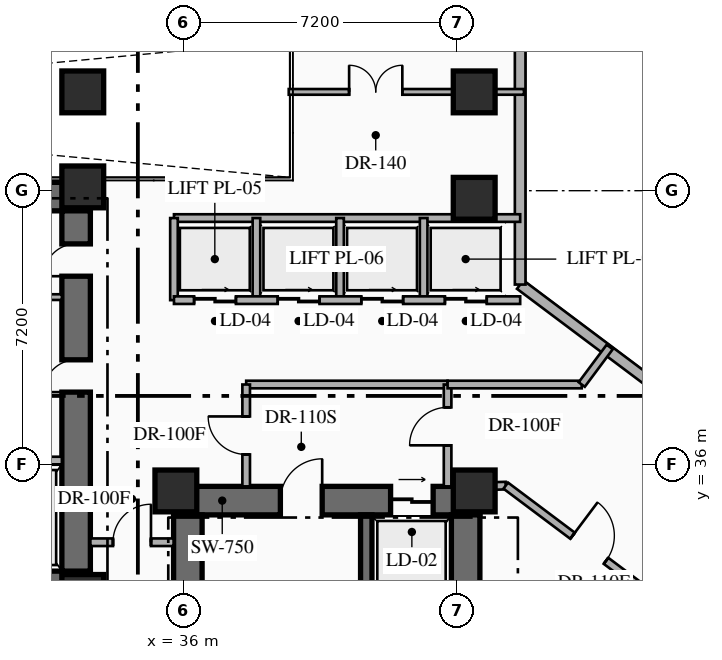
"""IFC4 building model, lengths in metres.
Left out: names, types, materials, properties, quantities, classifications, styles, units other than length and angle.
Written with IfcOpenShell. Run it as: python <this file> out.ifc"""

import sys

from ifc_helpers import new_model, si_unit, direction, frame, frame_2d, origin, origin_2d, place, context, subcontext, project, spatial, rectangle, hollow_rectangle, extrude, element, fill, save


model = new_model("IFC4")
c1 = context("Model", 3, precision=1e-05, world=origin(), true_north=direction((0.0, 1.0)))
c2 = subcontext(c1, "Body", "Model", "MODEL_VIEW")
j1 = project(units=[si_unit("LENGTHUNIT", "METRE"), si_unit("PLANEANGLEUNIT", "RADIAN")], contexts=[c1])
p1 = place(None, origin())
s1 = spatial("IfcSite", under=j1, at=p1, CompositionType="ELEMENT")
p2 = place(p1, origin())
s2 = spatial("IfcBuilding", under=s1, at=p2, CompositionType="ELEMENT")
p3 = place(p2, origin())
s3 = spatial("IfcBuildingStorey", under=s2, at=p3, CompositionType="ELEMENT", Elevation=0.0)
p4 = place(p3, frame((25.47, 32.815, 0.0), z_axis=(0.0, 0.0, 1.0), x_axis=(1.0, 0.0, 0.0)))
e1 = element("IfcWall", 1, at=p4, inside=s3, PredefinedType="SHEAR", context=c2, shape_type="SweptSolid", body=[
    extrude(rectangle(XDim=8.08, YDim=0.75, at=frame_2d((4.04, 0.0))), origin(), (0.0, 0.0, 1.0), 5.4),
])
p5 = place(p4, frame((2.98, 0.0, 0.0)))
e2 = element("IfcOpeningElement", 2, at=p5, cuts=e1, PredefinedType="OPENING", context=c2, shape_type="SweptSolid", body=[
    extrude(rectangle(XDim=1.1, YDim=2.2, at=frame_2d((0.55, 1.1))), frame((0.0, 0.385, 0.0), z_axis=(0.0, -1.0, 0.0), x_axis=(1.0, 0.0, 0.0)), (0.0, 0.0, 1.0), 0.77),
])
p6 = place(p4, frame((5.73, 0.0, 0.0)))
e3 = element("IfcOpeningElement", 3, at=p6, cuts=e1, PredefinedType="OPENING", context=c2, shape_type="SweptSolid", body=[
    extrude(rectangle(XDim=1.1, YDim=2.15, at=frame_2d((0.55, 1.075))), frame((0.0, 0.385, 0.0), z_axis=(0.0, -1.0, 0.0), x_axis=(1.0, 0.0, 0.0)), (0.0, 0.0, 1.0), 0.77),
])
p7 = place(p3, frame((25.47, 43.045, 0.0), z_axis=(0.0, 0.0, 1.0), x_axis=(1.0, 0.0, 0.0)))
e4 = element("IfcWall", 4, at=p7, inside=s3, PredefinedType="SHEAR", context=c2, shape_type="SweptSolid", body=[
    extrude(rectangle(XDim=8.08, YDim=0.75, at=frame_2d((4.04, 0.0))), origin(), (0.0, 0.0, 1.0), 5.4),
])
p8 = place(p3, frame((33.175, 33.19, 0.0), z_axis=(0.0, 0.0, 1.0), x_axis=(0.0, 1.0, 0.0)))
e5 = element("IfcWall", 5, at=p8, inside=s3, PredefinedType="SHEAR", context=c2, shape_type="SweptSolid", body=[
    extrude(rectangle(XDim=9.48, YDim=0.75, at=frame_2d((4.74, 0.0))), origin(), (0.0, 0.0, 1.0), 5.4),
])
p9 = place(p8, frame((4.71, 0.0, 0.0)))
e6 = element("IfcOpeningElement", 6, at=p9, cuts=e5, PredefinedType="OPENING", context=c2, shape_type="SweptSolid", body=[
    extrude(rectangle(XDim=0.85, YDim=2.08, at=frame_2d((0.425, 1.04))), frame((0.0, 0.385, 0.0), z_axis=(0.0, -1.0, 0.0), x_axis=(1.0, 0.0, 0.0)), (0.0, 0.0, 1.0), 0.77),
])
p10 = place(p8, frame((7.76, 0.0, 0.0)))
e7 = element("IfcOpeningElement", 7, at=p10, cuts=e5, PredefinedType="OPENING", context=c2, shape_type="SweptSolid", body=[
    extrude(rectangle(XDim=0.85, YDim=2.08, at=frame_2d((0.425, 1.04))), frame((0.0, 0.385, 0.0), z_axis=(0.0, -1.0, 0.0), x_axis=(1.0, 0.0, 0.0)), (0.0, 0.0, 1.0), 0.77),
])
p11 = place(p3, frame((35.74, 35.045, 0.0), z_axis=(0.0, 0.0, 1.0), x_axis=(1.0, 0.0, 0.0)))
e8 = element("IfcWall", 8, at=p11, inside=s3, PredefinedType="SHEAR", context=c2, shape_type="SweptSolid", body=[
    extrude(rectangle(XDim=8.06, YDim=0.75, at=frame_2d((4.03, 0.0))), origin(), (0.0, 0.0, 1.0), 5.4),
])
p12 = place(p11, frame((2.81, 0.0, 0.0)))
e9 = element("IfcOpeningElement", 9, at=p12, cuts=e8, PredefinedType="OPENING", context=c2, shape_type="SweptSolid", body=[
    extrude(rectangle(XDim=1.1, YDim=2.2, at=frame_2d((0.55, 1.1))), frame((0.0, 0.385, 0.0), z_axis=(0.0, -1.0, 0.0), x_axis=(1.0, 0.0, 0.0)), (0.0, 0.0, 1.0), 0.77),
])
p13 = place(p11, frame((5.71, 0.0, 0.0)))
e10 = element("IfcOpeningElement", 10, at=p13, cuts=e8, PredefinedType="OPENING", context=c2, shape_type="SweptSolid", body=[
    extrude(rectangle(XDim=1.12, YDim=2.15, at=frame_2d((0.56, 1.075))), frame((0.0, 0.385, 0.0), z_axis=(0.0, -1.0, 0.0), x_axis=(1.0, 0.0, 0.0)), (0.0, 0.0, 1.0), 0.77),
])
p14 = place(p3, frame((36.115, 25.19, 0.0), z_axis=(0.0, 0.0, 1.0), x_axis=(0.0, 1.0, 0.0)))
e11 = element("IfcWall", 11, at=p14, inside=s3, PredefinedType="SHEAR", context=c2, shape_type="SweptSolid", body=[
    extrude(rectangle(XDim=9.48, YDim=0.75, at=frame_2d((4.74, 0.0))), origin(), (0.0, 0.0, 1.0), 5.4),
])
p15 = place(p3, frame((43.425, 25.19, 0.0), z_axis=(0.0, 0.0, 1.0), x_axis=(0.0, 1.0, 0.0)))
e12 = element("IfcWall", 12, at=p15, inside=s3, PredefinedType="SHEAR", context=c2, shape_type="SweptSolid", body=[
    extrude(rectangle(XDim=9.48, YDim=0.75, at=frame_2d((4.74, 0.0))), origin(), (0.0, 0.0, 1.0), 5.4),
])
p16 = place(p15, frame((1.51, 0.0, 0.0)))
e13 = element("IfcOpeningElement", 13, at=p16, cuts=e12, PredefinedType="OPENING", context=c2, shape_type="SweptSolid", body=[
    extrude(rectangle(XDim=0.85, YDim=2.08, at=frame_2d((0.425, 1.04))), frame((0.0, 0.385, 0.0), z_axis=(0.0, -1.0, 0.0), x_axis=(1.0, 0.0, 0.0)), (0.0, 0.0, 1.0), 0.77),
])
p17 = place(p15, frame((4.76, 0.0, 0.0)))
e14 = element("IfcOpeningElement", 14, at=p17, cuts=e12, PredefinedType="OPENING", context=c2, shape_type="SweptSolid", body=[
    extrude(rectangle(XDim=0.85, YDim=2.08, at=frame_2d((0.425, 1.04))), frame((0.0, 0.385, 0.0), z_axis=(0.0, -1.0, 0.0), x_axis=(1.0, 0.0, 0.0)), (0.0, 0.0, 1.0), 0.77),
])
p18 = place(p3, frame((40.81, 25.19, 0.0), z_axis=(0.0, 0.0, 1.0), x_axis=(0.0, 1.0, 0.0)))
e15 = element("IfcWall", 15, at=p18, inside=s3, PredefinedType="SHEAR", context=c2, shape_type="SweptSolid", body=[
    extrude(rectangle(XDim=9.48, YDim=0.3, at=frame_2d((4.74, 0.0))), origin(), (0.0, 0.0, 1.0), 5.4),
])
for number, where, z_axis, x_axis in (
    (16, (33.35, 32.55, 0.0), (0.0, 0.0, 1.0), (1.0, 0.0, 0.0)),
    (17, (33.35, 43.3, 0.0), (0.0, 0.0, 1.0), (1.0, 0.0, 0.0)),
    (18, (35.8, 35.3, 0.0), (0.0, 0.0, 1.0), (1.0, 0.0, 0.0)),
    (19, (43.65, 35.3, 0.0), (0.0, 0.0, 1.0), (1.0, 0.0, 0.0)),
    (20, (43.65, 43.0, 0.0), (0.0, 0.0, 1.0), (1.0, 0.0, 0.0)),
):
    element("IfcColumn", number, at=place(p3, frame(where, z_axis=z_axis, x_axis=x_axis)), inside=s3, PredefinedType="COLUMN", context=c2, shape_type="SweptSolid", body=[
        extrude(rectangle(XDim=1.1, YDim=1.1, at=origin_2d()), origin(), (0.0, 0.0, 1.0), 5.4),
    ])
for number, where, z_axis, x_axis in (
    (21, (33.35, 45.8, 0.0), (0.0, 0.0, 1.0), (1.0, 0.0, 0.0)),
    (22, (43.65, 45.8, 0.0), (0.0, 0.0, 1.0), (1.0, 0.0, 0.0)),
):
    element("IfcColumn", number, at=place(p3, frame(where, z_axis=z_axis, x_axis=x_axis)), inside=s3, PredefinedType="COLUMN", context=c2, shape_type="SweptSolid", body=[
        extrude(hollow_rectangle(XDim=1.1, YDim=1.1, WallThickness=0.04, at=origin_2d()), origin(), (0.0, 0.0, 1.0), 5.4),
    ])
p19 = place(p3, frame((44.86, 40.73, 0.0), z_axis=(0.0, 0.0, 1.0), x_axis=(0.800006570398, -0.599991239369, 0.0)))
e23 = element("IfcWall", 23, at=p19, inside=s3, PredefinedType="STANDARD", context=c2, shape_type="SweptSolid", body=[
    extrude(rectangle(XDim=31.212, YDim=0.28, at=frame_2d((15.606, 0.0))), origin(), (0.0, 0.0, 1.0), 5.1),
])
p20 = place(p19, frame((4.5, 0.0, 0.0)))
e24 = element("IfcOpeningElement", 24, at=p20, cuts=e23, PredefinedType="OPENING", context=c2, shape_type="SweptSolid", body=[
    extrude(rectangle(XDim=2.1, YDim=2.3, at=frame_2d((1.05, 1.15))), frame((0.0, 0.15, 0.0), z_axis=(0.0, -1.0, 0.0), x_axis=(1.0, 0.0, 0.0)), (0.0, 0.0, 1.0), 0.3),
])
p21 = place(p19, frame((13.932, 0.0, 0.0)))
e25 = element("IfcOpeningElement", 25, at=p21, cuts=e23, PredefinedType="OPENING", context=c2, shape_type="SweptSolid", body=[
    extrude(rectangle(XDim=2.1, YDim=2.3, at=frame_2d((1.05, 1.15))), frame((0.0, 0.15, 0.0), z_axis=(0.0, -1.0, 0.0), x_axis=(1.0, 0.0, 0.0)), (0.0, 0.0, 1.0), 0.3),
])
p22 = place(p19, frame((21.423, 0.0, 0.0)))
e26 = element("IfcOpeningElement", 26, at=p22, cuts=e23, PredefinedType="OPENING", context=c2, shape_type="SweptSolid", body=[
    extrude(rectangle(XDim=2.1, YDim=2.3, at=frame_2d((1.05, 1.15))), frame((0.0, 0.15, 0.0), z_axis=(0.0, -1.0, 0.0), x_axis=(1.0, 0.0, 0.0)), (0.0, 0.0, 1.0), 0.3),
])
p23 = place(p19, frame((25.168, 0.0, 0.0)))
e27 = element("IfcOpeningElement", 27, at=p23, cuts=e23, PredefinedType="OPENING", context=c2, shape_type="SweptSolid", body=[
    extrude(rectangle(XDim=2.1, YDim=2.3, at=frame_2d((1.05, 1.15))), frame((0.0, 0.15, 0.0), z_axis=(0.0, -1.0, 0.0), x_axis=(1.0, 0.0, 0.0)), (0.0, 0.0, 1.0), 0.3),
])
p24 = place(p3, frame((44.86, 49.142, 0.0), z_axis=(0.0, 0.0, 1.0), x_axis=(0.0, -1.0, 0.0)))
e28 = element("IfcWall", 28, at=p24, inside=s3, PredefinedType="STANDARD", context=c2, shape_type="SweptSolid", body=[
    extrude(rectangle(XDim=8.412, YDim=0.28, at=frame_2d((4.206, 0.0))), origin(), (0.0, 0.0, 1.0), 5.1),
])
p25 = place(p3, frame((30.7, 36.1, 0.0), z_axis=(0.0, 0.0, 1.0), x_axis=(1.0, 0.0, 0.0)))
e29 = element("IfcWall", 29, at=p25, inside=s3, PredefinedType="STANDARD", context=c2, shape_type="SweptSolid", body=[
    extrude(rectangle(XDim=2.1, YDim=0.2, at=frame_2d((1.05, 0.0))), origin(), (0.0, 0.0, 1.0), 5.1),
])
p26 = place(p3, frame((30.7, 40.4, 0.0), z_axis=(0.0, 0.0, 1.0), x_axis=(1.0, 0.0, 0.0)))
e30 = element("IfcWall", 30, at=p26, inside=s3, PredefinedType="PARTITIONING", context=c2, shape_type="SweptSolid", body=[
    extrude(rectangle(XDim=2.1, YDim=0.15, at=frame_2d((1.05, 0.0))), origin(), (0.0, 0.0, 1.0), 5.1),
])
p27 = place(p3, frame((37.65, 38.1, 0.0), z_axis=(0.0, 0.0, 1.0), x_axis=(1.0, 0.0, 0.0)))
e31 = element("IfcWall", 31, at=p27, inside=s3, PredefinedType="STANDARD", context=c2, shape_type="SweptSolid", body=[
    extrude(rectangle(XDim=5.3, YDim=0.2, at=frame_2d((2.65, 0.0))), origin(), (0.0, 0.0, 1.0), 5.1),
])
p28 = place(p3, frame((42.95, 35.42, 0.0), z_axis=(0.0, 0.0, 1.0), x_axis=(0.0, 1.0, 0.0)))
e32 = element("IfcWall", 32, at=p28, inside=s3, PredefinedType="STANDARD", context=c2, shape_type="SweptSolid", body=[
    extrude(rectangle(XDim=2.68, YDim=0.2, at=frame_2d((1.34, 0.0))), origin(), (0.0, 0.0, 1.0), 5.1),
])
p29 = place(p28, frame((1.08, 0.0, 0.0)))
e33 = element("IfcOpeningElement", 33, at=p29, cuts=e32, PredefinedType="OPENING", context=c2, shape_type="SweptSolid", body=[
    extrude(rectangle(XDim=1.0, YDim=2.2, at=frame_2d((0.5, 1.1))), frame((0.0, 0.11, 0.0), z_axis=(0.0, -1.0, 0.0), x_axis=(1.0, 0.0, 0.0)), (0.0, 0.0, 1.0), 0.22),
])
p30 = place(p3, frame((37.65, 35.42, 0.0), z_axis=(0.0, 0.0, 1.0), x_axis=(0.0, 1.0, 0.0)))
e34 = element("IfcWall", 34, at=p30, inside=s3, PredefinedType="STANDARD", context=c2, shape_type="SweptSolid", body=[
    extrude(rectangle(XDim=2.68, YDim=0.2, at=frame_2d((1.34, 0.0))), origin(), (0.0, 0.0, 1.0), 5.1),
])
p31 = place(p30, frame((0.84, 0.0, 0.0)))
e35 = element("IfcOpeningElement", 35, at=p31, cuts=e34, PredefinedType="OPENING", context=c2, shape_type="SweptSolid", body=[
    extrude(rectangle(XDim=1.0, YDim=2.2, at=frame_2d((0.5, 1.1))), frame((0.0, 0.11, 0.0), z_axis=(0.0, -1.0, 0.0), x_axis=(1.0, 0.0, 0.0)), (0.0, 0.0, 1.0), 0.22),
])
p32 = place(p3, frame((35.75, 42.48, 0.0), z_axis=(0.0, 0.0, 1.0), x_axis=(1.0, 0.0, 0.0)))
e36 = element("IfcWall", 36, at=p32, inside=s3, PredefinedType="STANDARD", context=c2, shape_type="SweptSolid", body=[
    extrude(rectangle(XDim=9.11, YDim=0.2, at=frame_2d((4.555, 0.0))), origin(), (0.0, 0.0, 1.0), 5.1),
])
for number, where, z_axis, x_axis in (
    (37, (35.75, 40.32, 0.0), (0.0, 0.0, 1.0), (0.0, 1.0, 0.0)),
    (38, (37.92, 40.32, 0.0), (0.0, 0.0, 1.0), (0.0, 1.0, 0.0)),
    (39, (40.12, 40.32, 0.0), (0.0, 0.0, 1.0), (0.0, 1.0, 0.0)),
    (40, (42.32, 40.32, 0.0), (0.0, 0.0, 1.0), (0.0, 1.0, 0.0)),
):
    element("IfcWall", number, at=place(p3, frame(where, z_axis=z_axis, x_axis=x_axis)), inside=s3, PredefinedType="STANDARD", context=c2, shape_type="SweptSolid", body=[
        extrude(rectangle(XDim=2.16, YDim=0.2, at=frame_2d((1.08, 0.0))), origin(), (0.0, 0.0, 1.0), 5.1),
    ])
p33 = place(p3, frame((35.75, 40.32, 0.0), z_axis=(0.0, 0.0, 1.0), x_axis=(1.0, 0.0, 0.0)))
e41 = element("IfcWall", 41, at=p33, inside=s3, PredefinedType="STANDARD", context=c2, shape_type="SweptSolid", body=[
    extrude(rectangle(XDim=9.11, YDim=0.2, at=frame_2d((4.555, 0.0))), origin(), (0.0, 0.0, 1.0), 5.1),
])
p34 = place(p33, frame((0.53, 0.0, 0.0)))
e42 = element("IfcOpeningElement", 42, at=p34, cuts=e41, PredefinedType="OPENING", context=c2, shape_type="SweptSolid", body=[
    extrude(rectangle(XDim=1.1, YDim=2.18, at=frame_2d((0.55, 1.09))), frame((0.0, 0.11, 0.0), z_axis=(0.0, -1.0, 0.0), x_axis=(1.0, 0.0, 0.0)), (0.0, 0.0, 1.0), 0.22),
])
p35 = place(p33, frame((2.73, 0.0, 0.0)))
e43 = element("IfcOpeningElement", 43, at=p35, cuts=e41, PredefinedType="OPENING", context=c2, shape_type="SweptSolid", body=[
    extrude(rectangle(XDim=1.1, YDim=2.18, at=frame_2d((0.55, 1.09))), frame((0.0, 0.11, 0.0), z_axis=(0.0, -1.0, 0.0), x_axis=(1.0, 0.0, 0.0)), (0.0, 0.0, 1.0), 0.22),
])
p36 = place(p33, frame((4.93, 0.0, 0.0)))
e44 = element("IfcOpeningElement", 44, at=p36, cuts=e41, PredefinedType="OPENING", context=c2, shape_type="SweptSolid", body=[
    extrude(rectangle(XDim=1.1, YDim=2.18, at=frame_2d((0.55, 1.09))), frame((0.0, 0.11, 0.0), z_axis=(0.0, -1.0, 0.0), x_axis=(1.0, 0.0, 0.0)), (0.0, 0.0, 1.0), 0.22),
])
p37 = place(p33, frame((7.13, 0.0, 0.0)))
e45 = element("IfcOpeningElement", 45, at=p37, cuts=e41, PredefinedType="OPENING", context=c2, shape_type="SweptSolid", body=[
    extrude(rectangle(XDim=1.1, YDim=2.18, at=frame_2d((0.55, 1.09))), frame((0.0, 0.11, 0.0), z_axis=(0.0, -1.0, 0.0), x_axis=(1.0, 0.0, 0.0)), (0.0, 0.0, 1.0), 0.22),
])
p38 = place(p3, frame((33.55, 33.95, 0.0), z_axis=(0.0, 0.0, 1.0), x_axis=(1.0, 0.0, 0.0)))
e46 = element("IfcWall", 46, at=p38, inside=s3, PredefinedType="STANDARD", context=c2, shape_type="SweptSolid", body=[
    extrude(rectangle(XDim=2.19, YDim=0.2, at=frame_2d((1.095, 0.0))), origin(), (0.0, 0.0, 1.0), 5.1),
])
p39 = place(p38, frame((0.595, 0.0, 0.0)))
e47 = element("IfcOpeningElement", 47, at=p39, cuts=e46, PredefinedType="OPENING", context=c2, shape_type="SweptSolid", body=[
    extrude(rectangle(XDim=1.0, YDim=2.2, at=frame_2d((0.5, 1.1))), frame((0.0, 0.11, 0.0), z_axis=(0.0, -1.0, 0.0), x_axis=(1.0, 0.0, 0.0)), (0.0, 0.0, 1.0), 0.22),
])
p40 = place(p3, frame((42.95, 38.1, 0.0), z_axis=(0.0, 0.0, 1.0), x_axis=(1.0, 0.0, 0.0)))
e48 = element("IfcWall", 48, at=p40, inside=s3, PredefinedType="STANDARD", context=c2, shape_type="SweptSolid", body=[
    extrude(rectangle(XDim=3.53, YDim=0.2, at=frame_2d((1.765, 0.0))), origin(), (0.0, 0.0, 1.0), 5.1),
])
p41 = place(p3, frame((46.48, 38.1, 0.0), z_axis=(0.0, 0.0, 1.0), x_axis=(0.597523800128, 0.801851175893, 0.0)))
e49 = element("IfcWall", 49, at=p41, inside=s3, PredefinedType="STANDARD", context=c2, shape_type="SweptSolid", body=[
    extrude(rectangle(XDim=1.232, YDim=0.2, at=frame_2d((0.616, 0.0))), origin(), (0.0, 0.0, 1.0), 5.1),
])
p42 = place(p3, frame((43.8, 35.42, 0.0), z_axis=(0.0, 0.0, 1.0), x_axis=(0.999566823339, 0.029430692824, 0.0)))
e50 = element("IfcWall", 50, at=p42, inside=s3, PredefinedType="STANDARD", context=c2, shape_type="SweptSolid", body=[
    extrude(rectangle(XDim=0.68, YDim=0.2, at=frame_2d((0.34, 0.0))), origin(), (0.0, 0.0, 1.0), 5.1),
])
p43 = place(p3, frame((44.48, 35.44, 0.0), z_axis=(0.0, 0.0, 1.0), x_axis=(0.799995034401, -0.600006620742, 0.0)))
e51 = element("IfcWall", 51, at=p43, inside=s3, PredefinedType="STANDARD", context=c2, shape_type="SweptSolid", body=[
    extrude(rectangle(XDim=5.9, YDim=0.2, at=frame_2d((2.95, 0.0))), origin(), (0.0, 0.0, 1.0), 4.495),
])
p44 = place(p43, frame((2.198, 0.0, 0.0)))
e52 = element("IfcOpeningElement", 52, at=p44, cuts=e51, PredefinedType="OPENING", context=c2, shape_type="SweptSolid", body=[
    extrude(rectangle(XDim=1.1, YDim=2.24, at=frame_2d((0.55, 1.12))), frame((0.0, 0.11, 0.0), z_axis=(0.0, -1.0, 0.0), x_axis=(1.0, 0.0, 0.0)), (0.0, 0.0, 1.0), 0.22),
])
p45 = place(p3, frame((47.12, 22.96, 0.0), z_axis=(0.0, 0.0, 1.0), x_axis=(0.599996985882, 0.80000226058, 0.0)))
e53 = element("IfcWall", 53, at=p45, inside=s3, PredefinedType="PARTITIONING", context=c2, shape_type="SweptSolid", body=[
    extrude(rectangle(XDim=12.96, YDim=0.15, at=frame_2d((6.48, 0.0))), origin(), (0.0, 0.0, 1.0), 5.1),
])
p46 = place(p45, frame((6.485, 0.0, 0.0)))
e54 = element("IfcOpeningElement", 54, at=p46, cuts=e53, PredefinedType="OPENING", context=c2, shape_type="SweptSolid", body=[
    extrude(rectangle(XDim=1.1, YDim=2.16, at=frame_2d((0.55, 1.08))), frame((0.0, 0.085, 0.0), z_axis=(0.0, -1.0, 0.0), x_axis=(1.0, 0.0, 0.0)), (0.0, 0.0, 1.0), 0.17),
])
p47 = place(p3, frame((38.77, 45.8, 0.0), z_axis=(0.0, 0.0, 1.0), x_axis=(1.0, 0.0, 0.0)))
e55 = element("IfcWall", 55, at=p47, inside=s3, PredefinedType="PARTITIONING", context=c2, shape_type="SweptSolid", body=[
    extrude(rectangle(XDim=6.19, YDim=0.15, at=frame_2d((3.095, 0.0))), origin(), (0.0, 0.0, 1.0), 3.895),
])
p48 = place(p47, frame((1.589, 0.0, 0.0)))
e56 = element("IfcOpeningElement", 56, at=p48, cuts=e55, PredefinedType="OPENING", context=c2, shape_type="SweptSolid", body=[
    extrude(rectangle(XDim=1.4, YDim=2.3, at=frame_2d((0.7, 1.15))), frame((0.0, 0.085, 0.0), z_axis=(0.0, -1.0, 0.0), x_axis=(1.0, 0.0, 0.0)), (0.0, 0.0, 1.0), 0.17),
])
p49 = place(p12, origin())
e57 = element("IfcDoor", 57, at=p49, inside=s3, OperationType="SINGLE_SWING_RIGHT", PredefinedType="DOOR", context=c2, shape_type="SweptSolid", body=[
    extrude(rectangle(XDim=1.1, YDim=2.2, at=frame_2d((0.55, 1.1))), frame((0.0, 0.025, 0.0), z_axis=(0.0, -1.0, 0.0), x_axis=(1.0, 0.0, 0.0)), (0.0, 0.0, 1.0), 0.05),
])
fill(e9, e57)
p50 = place(p13, origin())
e58 = element("IfcDoor", 58, at=p50, inside=s3, OperationType="SLIDING_TO_RIGHT", PredefinedType="USERDEFINED", context=c2, shape_type="SweptSolid", body=[
    extrude(rectangle(XDim=1.12, YDim=2.15, at=frame_2d((0.56, 1.075))), frame((0.0, 0.025, 0.0), z_axis=(0.0, -1.0, 0.0), x_axis=(1.0, 0.0, 0.0)), (0.0, 0.0, 1.0), 0.05),
])
fill(e10, e58)
p51 = place(p9, origin())
e59 = element("IfcDoor", 59, at=p51, inside=s3, OperationType="SINGLE_SWING_LEFT", PredefinedType="DOOR", context=c2, shape_type="SweptSolid", body=[
    extrude(rectangle(XDim=0.85, YDim=2.08, at=frame_2d((0.425, 1.04))), frame((0.0, 0.025, 0.0), z_axis=(0.0, -1.0, 0.0), x_axis=(1.0, 0.0, 0.0)), (0.0, 0.0, 1.0), 0.05),
])
fill(e6, e59)
p52 = place(p10, origin())
e60 = element("IfcDoor", 60, at=p52, inside=s3, OperationType="SINGLE_SWING_LEFT", PredefinedType="DOOR", context=c2, shape_type="SweptSolid", body=[
    extrude(rectangle(XDim=0.85, YDim=2.08, at=frame_2d((0.425, 1.04))), frame((0.0, 0.025, 0.0), z_axis=(0.0, -1.0, 0.0), x_axis=(1.0, 0.0, 0.0)), (0.0, 0.0, 1.0), 0.05),
])
fill(e7, e60)
p53 = place(p29, origin())
e61 = element("IfcDoor", 61, at=p53, inside=s3, OperationType="SINGLE_SWING_LEFT", PredefinedType="DOOR", context=c2, shape_type="SweptSolid", body=[
    extrude(rectangle(XDim=1.0, YDim=2.2, at=frame_2d((0.5, 1.1))), frame((0.0, 0.025, 0.0), z_axis=(0.0, -1.0, 0.0), x_axis=(1.0, 0.0, 0.0)), (0.0, 0.0, 1.0), 0.05),
])
fill(e33, e61)
p54 = place(p31, origin())
e62 = element("IfcDoor", 62, at=p54, inside=s3, OperationType="SINGLE_SWING_RIGHT", PredefinedType="DOOR", context=c2, shape_type="SweptSolid", body=[
    extrude(rectangle(XDim=1.0, YDim=2.2, at=frame_2d((0.5, 1.1))), frame((0.0, 0.025, 0.0), z_axis=(0.0, -1.0, 0.0), x_axis=(1.0, 0.0, 0.0)), (0.0, 0.0, 1.0), 0.05),
])
fill(e35, e62)
p55 = place(p34, origin())
e63 = element("IfcDoor", 63, at=p55, inside=s3, OperationType="SLIDING_TO_RIGHT", PredefinedType="USERDEFINED", context=c2, shape_type="SweptSolid", body=[
    extrude(rectangle(XDim=1.1, YDim=2.18, at=frame_2d((0.55, 1.09))), frame((0.0, 0.025, 0.0), z_axis=(0.0, -1.0, 0.0), x_axis=(1.0, 0.0, 0.0)), (0.0, 0.0, 1.0), 0.05),
])
fill(e42, e63)
p56 = place(p35, origin())
e64 = element("IfcDoor", 64, at=p56, inside=s3, OperationType="SLIDING_TO_RIGHT", PredefinedType="USERDEFINED", context=c2, shape_type="SweptSolid", body=[
    extrude(rectangle(XDim=1.1, YDim=2.18, at=frame_2d((0.55, 1.09))), frame((0.0, 0.025, 0.0), z_axis=(0.0, -1.0, 0.0), x_axis=(1.0, 0.0, 0.0)), (0.0, 0.0, 1.0), 0.05),
])
fill(e43, e64)
p57 = place(p36, origin())
e65 = element("IfcDoor", 65, at=p57, inside=s3, OperationType="SLIDING_TO_RIGHT", PredefinedType="USERDEFINED", context=c2, shape_type="SweptSolid", body=[
    extrude(rectangle(XDim=1.1, YDim=2.18, at=frame_2d((0.55, 1.09))), frame((0.0, 0.025, 0.0), z_axis=(0.0, -1.0, 0.0), x_axis=(1.0, 0.0, 0.0)), (0.0, 0.0, 1.0), 0.05),
])
fill(e44, e65)
p58 = place(p37, origin())
e66 = element("IfcDoor", 66, at=p58, inside=s3, OperationType="SLIDING_TO_RIGHT", PredefinedType="USERDEFINED", context=c2, shape_type="SweptSolid", body=[
    extrude(rectangle(XDim=1.1, YDim=2.18, at=frame_2d((0.55, 1.09))), frame((0.0, 0.025, 0.0), z_axis=(0.0, -1.0, 0.0), x_axis=(1.0, 0.0, 0.0)), (0.0, 0.0, 1.0), 0.05),
])
fill(e45, e66)
p59 = place(p39, origin())
e67 = element("IfcDoor", 67, at=p59, inside=s3, OperationType="SINGLE_SWING_RIGHT", PredefinedType="DOOR", context=c2, shape_type="SweptSolid", body=[
    extrude(rectangle(XDim=1.0, YDim=2.2, at=frame_2d((0.5, 1.1))), frame((0.0, 0.025, 0.0), z_axis=(0.0, -1.0, 0.0), x_axis=(1.0, 0.0, 0.0)), (0.0, 0.0, 1.0), 0.05),
])
fill(e47, e67)
p60 = place(p44, origin())
e68 = element("IfcDoor", 68, at=p60, inside=s3, OperationType="SINGLE_SWING_LEFT", PredefinedType="DOOR", context=c2, shape_type="SweptSolid", body=[
    extrude(rectangle(XDim=1.1, YDim=2.24, at=frame_2d((0.55, 1.12))), frame((0.0, 0.025, 0.0), z_axis=(0.0, -1.0, 0.0), x_axis=(1.0, 0.0, 0.0)), (0.0, 0.0, 1.0), 0.05),
])
fill(e52, e68)
p61 = place(p48, origin())
e69 = element("IfcDoor", 69, at=p61, inside=s3, OperationType="DOUBLE_DOOR_SINGLE_SWING", PredefinedType="DOOR", context=c2, shape_type="SweptSolid", body=[
    extrude(rectangle(XDim=1.4, YDim=2.3, at=frame_2d((0.7, 1.15))), frame((0.0, 0.025, 0.0), z_axis=(0.0, -1.0, 0.0), x_axis=(1.0, 0.0, 0.0)), (0.0, 0.0, 1.0), 0.05),
])
fill(e56, e69)
save(model, sys.argv[1])
